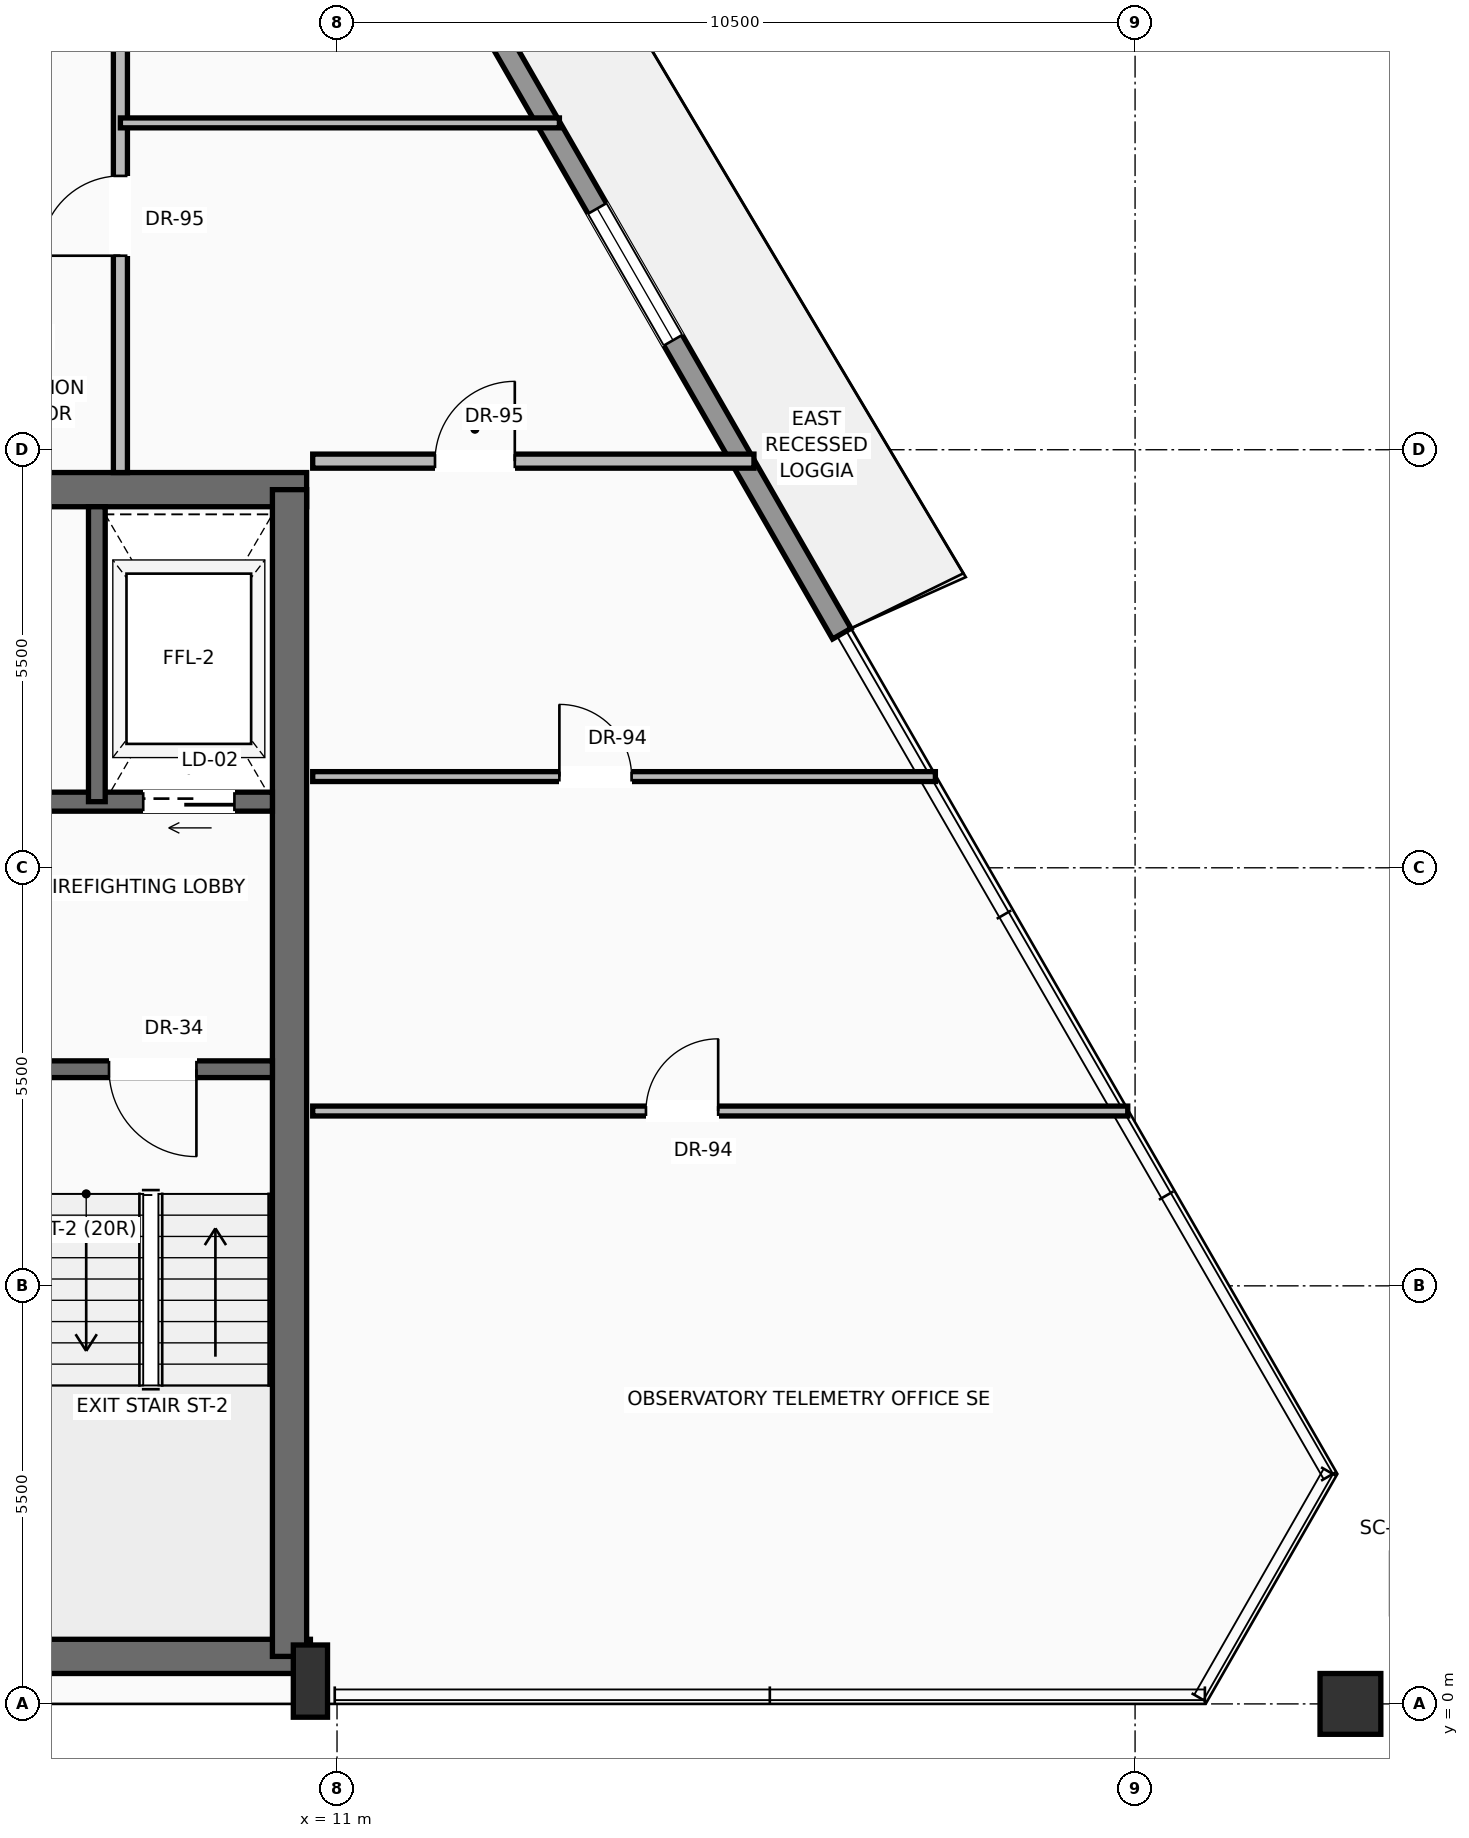
"""IFC4 building model, lengths in metres.
Left out: names, types, materials, properties, quantities, classifications, styles, units other than length and angle.
Written with IfcOpenShell. Run it as: python <this file> out.ifc"""

import sys

from ifc_helpers import new_model, si_unit, direction, frame, frame_2d, origin, origin_2d, place, context, subcontext, project, spatial, rectangle, hollow_rectangle, extrude, source, transform, mapped, element, fill, save


model = new_model("IFC4")
c1 = context("Model", 3, precision=1e-05, world=origin(), true_north=direction((0.0, 1.0)))
c2 = subcontext(c1, "Body", "Model", "MODEL_VIEW")
j1 = project(units=[si_unit("LENGTHUNIT", "METRE"), si_unit("PLANEANGLEUNIT", "RADIAN")], contexts=[c1])
p1 = place(None, origin())
s1 = spatial("IfcSite", under=j1, at=p1, CompositionType="ELEMENT")
p2 = place(p1, origin())
s2 = spatial("IfcBuilding", under=s1, at=p2, CompositionType="ELEMENT")
p3 = place(p2, frame((0.0, 0.0, 297.15)))
s3 = spatial("IfcBuildingStorey", under=s2, at=p3, CompositionType="ELEMENT", Elevation=297.15)
p4 = place(p3, frame((-10.65, 0.625, 0.0), z_axis=(0.0, 0.0, 1.0), x_axis=(1.0, 0.0, 0.0)))
e1 = element("IfcWall", 1, at=p4, inside=s3, PredefinedType="SHEAR", context=c2, shape_type="SweptSolid", body=[
    extrude(rectangle(XDim=21.3, YDim=0.45, at=frame_2d((10.65, 0.0))), origin(), (0.0, 0.0, 1.0), 3.24),
])
p5 = place(p3, frame((-10.6, 15.975, 0.0), z_axis=(0.0, 0.0, 1.0), x_axis=(1.0, 0.0, 0.0)))
e2 = element("IfcWall", 2, at=p5, inside=s3, PredefinedType="SHEAR", context=c2, shape_type="SweptSolid", body=[
    extrude(rectangle(XDim=21.2, YDim=0.45, at=frame_2d((10.6, 0.0))), origin(), (0.0, 0.0, 1.0), 3.24),
])
p6 = place(p5, frame((3.17, 0.0, 0.0)))
e3 = element("IfcOpeningElement", 3, at=p6, cuts=e2, PredefinedType="OPENING", context=c2, shape_type="SweptSolid", body=[
    extrude(rectangle(XDim=1.3, YDim=2.3, at=frame_2d((0.65, 1.15))), frame((0.0, 0.235, 0.0), z_axis=(0.0, -1.0, 0.0), x_axis=(1.0, 0.0, 0.0)), (0.0, 0.0, 1.0), 0.47),
])
p7 = place(p5, frame((9.6, 0.0, 0.0)))
e4 = element("IfcOpeningElement", 4, at=p7, cuts=e2, PredefinedType="OPENING", context=c2, shape_type="SweptSolid", body=[
    extrude(rectangle(XDim=2.0, YDim=2.4, at=frame_2d((1.0, 1.2))), frame((0.0, 0.235, 0.0), z_axis=(0.0, -1.0, 0.0), x_axis=(1.0, 0.0, 0.0)), (0.0, 0.0, 1.0), 0.47),
])
p8 = place(p3, frame((10.375, 0.625, 0.0), z_axis=(0.0, 0.0, 1.0), x_axis=(0.0, 1.0, 0.0)))
e5 = element("IfcWall", 5, at=p8, inside=s3, PredefinedType="SHEAR", context=c2, shape_type="SweptSolid", body=[
    extrude(rectangle(XDim=15.35, YDim=0.45, at=frame_2d((7.675, 0.0))), origin(), (0.0, 0.0, 1.0), 3.24),
])
m1 = source(origin(), c2, "Body", "SweptSolid", [
    extrude(rectangle(XDim=0.45, YDim=0.95, at=origin_2d()), origin(), (0.0, 0.0, 1.0), 3.45),
])
p9 = place(p3, frame((10.65, 0.3, 0.0), z_axis=(0.0, 0.0, 1.0), x_axis=(1.0, 0.0, 0.0)))
e6 = element("IfcColumn", 6, at=p9, inside=s3, PredefinedType="PILASTER", context=c2, shape_type="MappedRepresentation", body=[
    mapped(m1, transform((0.0, 0.0, 0.0), scale=1.0)),
])
m2 = source(origin(), c2, "Body", "SweptSolid", [
    extrude(hollow_rectangle(XDim=0.8, YDim=0.8, WallThickness=0.04, at=origin_2d()), origin(), (0.0, 0.0, 1.0), 3.441),
])
p10 = place(p3, frame((24.333, 0.0, 0.004), z_axis=(-0.004965886556, 0.0, 0.999987669909), x_axis=(0.0, -1.0, 0.0)))
e7 = element("IfcColumn", 7, at=p10, inside=s3, PredefinedType="COLUMN", context=c2, shape_type="MappedRepresentation", body=[
    mapped(m2, transform((0.0, 0.0, 0.0), scale=1.0)),
])
m3 = source(origin(), c2, "Body", "SweptSolid", [
    extrude(hollow_rectangle(XDim=0.8, YDim=0.8, WallThickness=0.04, at=origin_2d()), origin(), (0.0, 0.0, 1.0), 3.442),
])
p11 = place(p3, frame((25.274, 1.585, 0.004), z_axis=(-0.014256272431, -0.015178319902, 0.999783165142), x_axis=(0.728899576498, -0.684620630262, 0.0)))
e8 = element("IfcColumn", 8, at=p11, inside=s3, PredefinedType="COLUMN", context=c2, shape_type="MappedRepresentation", body=[
    mapped(m3, transform((0.0, 0.0, 0.0), scale=1.0)),
])
p12 = place(p3, frame((7.586, 31.561, 0.0), z_axis=(0.0, 0.0, 1.0), x_axis=(0.498604857305, -0.866829392829, 0.0)))
e9 = element("IfcWall", 9, at=p12, inside=s3, PredefinedType="SOLIDWALL", context=c2, shape_type="SweptSolid", body=[
    extrude(rectangle(XDim=20.167, YDim=0.28, at=frame_2d((10.083, 0.0))), origin(), (0.0, 0.0, 1.0), 2.82),
])
p13 = place(p12, frame((4.84, 0.0, 0.0)))
e10 = element("IfcOpeningElement", 10, at=p13, cuts=e9, PredefinedType="OPENING", context=c2, shape_type="SweptSolid", body=[
    extrude(rectangle(XDim=1.6, YDim=2.35, at=frame_2d((0.8, 1.175))), frame((0.0, 0.15, 0.0), z_axis=(0.0, -1.0, 0.0), x_axis=(1.0, 0.0, 0.0)), (0.0, 0.0, 1.0), 0.3),
])
p14 = place(p12, frame((13.714, 0.0, 0.9)))
e11 = element("IfcOpeningElement", 11, at=p14, cuts=e9, PredefinedType="OPENING", context=c2, shape_type="SweptSolid", body=[
    extrude(rectangle(XDim=2.0, YDim=1.75, at=frame_2d((1.0, 0.875))), frame((0.0, 0.15, 0.0), z_axis=(0.0, -1.0, 0.0), x_axis=(1.0, 0.0, 0.0)), (0.0, 0.0, 1.0), 0.3),
])
p15 = place(p3, frame((10.15, 8.35, 0.0), z_axis=(0.0, 0.0, 1.0), x_axis=(-1.0, 0.0, 0.0)))
e12 = element("IfcWall", 12, at=p15, inside=s3, PredefinedType="SOLIDWALL", context=c2, shape_type="SweptSolid", body=[
    extrude(rectangle(XDim=4.65, YDim=0.22, at=frame_2d((2.325, 0.0))), origin(), (0.0, 0.0, 1.0), 3.24),
])
p16 = place(p15, frame((1.0, 0.0, 0.0)))
e13 = element("IfcOpeningElement", 13, at=p16, cuts=e12, PredefinedType="OPENING", context=c2, shape_type="SweptSolid", body=[
    extrude(rectangle(XDim=1.15, YDim=2.2, at=frame_2d((0.575, 1.1))), frame((0.0, 0.12, 0.0), z_axis=(0.0, -1.0, 0.0), x_axis=(1.0, 0.0, 0.0)), (0.0, 0.0, 1.0), 0.24),
])
p17 = place(p3, frame((10.15, 11.87, 0.0), z_axis=(0.0, 0.0, 1.0), x_axis=(-1.0, 0.0, 0.0)))
e14 = element("IfcWall", 14, at=p17, inside=s3, PredefinedType="SOLIDWALL", context=c2, shape_type="SweptSolid", body=[
    extrude(rectangle(XDim=4.65, YDim=0.25, at=frame_2d((2.325, 0.0))), origin(), (0.0, 0.0, 1.0), 3.24),
])
p18 = place(p17, frame((0.5, 0.0, 0.0)))
e15 = element("IfcOpeningElement", 15, at=p18, cuts=e14, PredefinedType="OPENING", context=c2, shape_type="SweptSolid", body=[
    extrude(rectangle(XDim=1.2, YDim=2.25, at=frame_2d((0.6, 1.125))), frame((0.0, 0.135, 0.0), z_axis=(0.0, -1.0, 0.0), x_axis=(1.0, 0.0, 0.0)), (0.0, 0.0, 1.0), 0.27),
])
p19 = place(p3, frame((7.84, 11.87, 0.0), z_axis=(0.0, 0.0, 1.0), x_axis=(0.0, 1.0, 0.0)))
e16 = element("IfcWall", 16, at=p19, inside=s3, PredefinedType="SOLIDWALL", context=c2, shape_type="SweptSolid", body=[
    extrude(rectangle(XDim=3.88, YDim=0.22, at=frame_2d((1.94, 0.0))), origin(), (0.0, 0.0, 1.0), 3.24),
])
p20 = place(p3, frame((8.15, 16.2, 0.0), z_axis=(0.0, 0.0, 1.0), x_axis=(0.0, 1.0, 0.0)))
e17 = element("IfcWall", 17, at=p20, inside=s3, PredefinedType="PARTITIONING", context=c2, shape_type="SweptSolid", body=[
    extrude(rectangle(XDim=13.6, YDim=0.185, at=frame_2d((6.8, 0.0))), origin(), (0.0, 0.0, 1.0), 3.232),
])
p21 = place(p20, frame((2.853, 0.0, 0.0)))
e18 = element("IfcOpeningElement", 18, at=p21, cuts=e17, PredefinedType="OPENING", context=c2, shape_type="SweptSolid", body=[
    extrude(rectangle(XDim=1.05, YDim=2.25, at=frame_2d((0.525, 1.125))), frame((0.0, 0.103, 0.0), z_axis=(0.0, -1.0, 0.0), x_axis=(1.0, 0.0, 0.0)), (0.0, 0.0, 1.0), 0.205),
])
p22 = place(p20, frame((6.853, 0.0, 0.0)))
e19 = element("IfcOpeningElement", 19, at=p22, cuts=e17, PredefinedType="OPENING", context=c2, shape_type="SweptSolid", body=[
    extrude(rectangle(XDim=1.05, YDim=2.25, at=frame_2d((0.525, 1.125))), frame((0.0, 0.103, 0.0), z_axis=(0.0, -1.0, 0.0), x_axis=(1.0, 0.0, 0.0)), (0.0, 0.0, 1.0), 0.205),
])
p23 = place(p20, frame((11.185, 0.0, 0.0)))
e20 = element("IfcOpeningElement", 20, at=p23, cuts=e17, PredefinedType="OPENING", context=c2, shape_type="SweptSolid", body=[
    extrude(rectangle(XDim=1.05, YDim=2.25, at=frame_2d((0.525, 1.125))), frame((0.0, 0.103, 0.0), z_axis=(0.0, -1.0, 0.0), x_axis=(1.0, 0.0, 0.0)), (0.0, 0.0, 1.0), 0.205),
])
p24 = place(p3, frame((10.68, 16.35, 0.0), z_axis=(0.0, 0.0, 1.0), x_axis=(1.0, 0.0, 0.0)))
e21 = element("IfcWall", 21, at=p24, inside=s3, PredefinedType="PARTITIONING", context=c2, shape_type="SweptSolid", body=[
    extrude(rectangle(XDim=5.806, YDim=0.185, at=frame_2d((2.903, 0.0))), origin(), (0.0, 0.0, 1.0), 3.232),
])
p25 = place(p24, frame((1.609, 0.0, 0.0)))
e22 = element("IfcOpeningElement", 22, at=p25, cuts=e21, PredefinedType="OPENING", context=c2, shape_type="SweptSolid", body=[
    extrude(rectangle(XDim=1.05, YDim=2.25, at=frame_2d((0.525, 1.125))), frame((0.0, 0.103, 0.0), z_axis=(0.0, -1.0, 0.0), x_axis=(1.0, 0.0, 0.0)), (0.0, 0.0, 1.0), 0.205),
])
p26 = place(p3, frame((10.68, 7.8, 0.0), z_axis=(0.0, 0.0, 1.0), x_axis=(1.0, 0.0, 0.0)))
e23 = element("IfcWall", 23, at=p26, inside=s3, PredefinedType="PARTITIONING", context=c2, shape_type="SweptSolid", body=[
    extrude(rectangle(XDim=10.724, YDim=0.13, at=frame_2d((5.362, 0.0))), origin(), (0.0, 0.0, 1.0), 3.232),
])
p27 = place(p26, frame((4.385, 0.0, 0.0)))
e24 = element("IfcOpeningElement", 24, at=p27, cuts=e23, PredefinedType="OPENING", context=c2, shape_type="SweptSolid", body=[
    extrude(rectangle(XDim=0.95, YDim=2.2, at=frame_2d((0.475, 1.1))), frame((0.0, 0.075, 0.0), z_axis=(0.0, -1.0, 0.0), x_axis=(1.0, 0.0, 0.0)), (0.0, 0.0, 1.0), 0.15),
])
p28 = place(p3, frame((10.68, 12.2, 0.0), z_axis=(0.0, 0.0, 1.0), x_axis=(1.0, 0.0, 0.0)))
e25 = element("IfcWall", 25, at=p28, inside=s3, PredefinedType="PARTITIONING", context=c2, shape_type="SweptSolid", body=[
    extrude(rectangle(XDim=8.193, YDim=0.13, at=frame_2d((4.096, 0.0))), origin(), (0.0, 0.0, 1.0), 3.232),
])
p29 = place(p28, frame((3.246, 0.0, 0.0)))
e26 = element("IfcOpeningElement", 26, at=p29, cuts=e25, PredefinedType="OPENING", context=c2, shape_type="SweptSolid", body=[
    extrude(rectangle(XDim=0.95, YDim=2.2, at=frame_2d((0.475, 1.1))), frame((0.0, 0.075, 0.0), z_axis=(0.0, -1.0, 0.0), x_axis=(1.0, 0.0, 0.0)), (0.0, 0.0, 1.0), 0.15),
])
p30 = place(p3, frame((8.15, 20.8, 0.0), z_axis=(0.0, 0.0, 1.0), x_axis=(1.0, 0.0, 0.0)))
e27 = element("IfcWall", 27, at=p30, inside=s3, PredefinedType="PARTITIONING", context=c2, shape_type="SweptSolid", body=[
    extrude(rectangle(XDim=5.776, YDim=0.13, at=frame_2d((2.888, 0.0))), origin(), (0.0, 0.0, 1.0), 3.232),
])
m4 = source(origin(), c2, "Body", "SweptSolid", [
    extrude(rectangle(XDim=2.0, YDim=1.75, at=frame_2d((1.0, 0.875))), frame((0.0, 0.03, 0.0), z_axis=(0.0, -1.0, 0.0), x_axis=(1.0, 0.0, 0.0)), (0.0, 0.0, 1.0), 0.06),
])
p31 = place(p14, origin())
e28 = element("IfcWindow", 28, at=p31, inside=s3, PartitioningType="SINGLE_PANEL", PredefinedType="WINDOW", context=c2, shape_type="MappedRepresentation", body=[
    mapped(m4, transform((0.0, 0.0, 0.0), scale=1.0)),
])
fill(e11, e28)
m5 = source(origin(), c2, "Body", "SweptSolid", [
    extrude(rectangle(XDim=1.15, YDim=2.2, at=frame_2d((0.575, 1.1))), frame((0.0, 0.025, 0.0), z_axis=(0.0, -1.0, 0.0), x_axis=(1.0, 0.0, 0.0)), (0.0, 0.0, 1.0), 0.05),
])
p32 = place(p16, origin())
e29 = element("IfcDoor", 29, at=p32, inside=s3, OperationType="SINGLE_SWING_LEFT", PredefinedType="DOOR", context=c2, shape_type="MappedRepresentation", body=[
    mapped(m5, transform((0.0, 0.0, 0.0), scale=1.0)),
])
fill(e13, e29)
m6 = source(origin(), c2, "Body", "SweptSolid", [
    extrude(rectangle(XDim=1.2, YDim=2.25, at=frame_2d((0.6, 1.125))), frame((0.0, 0.025, 0.0), z_axis=(0.0, -1.0, 0.0), x_axis=(1.0, 0.0, 0.0)), (0.0, 0.0, 1.0), 0.05),
])
p33 = place(p18, origin())
e30 = element("IfcDoor", 30, at=p33, inside=s3, OperationType="SLIDING_TO_RIGHT", PredefinedType="DOOR", context=c2, shape_type="MappedRepresentation", body=[
    mapped(m6, transform((0.0, 0.0, 0.0), scale=1.0)),
])
fill(e15, e30)
m7 = source(origin(), c2, "Body", "SweptSolid", [
    extrude(rectangle(XDim=1.05, YDim=2.25, at=frame_2d((0.525, 1.125))), frame((0.0, 0.025, 0.0), z_axis=(0.0, -1.0, 0.0), x_axis=(1.0, 0.0, 0.0)), (0.0, 0.0, 1.0), 0.05),
])
p34 = place(p25, origin())
e31 = element("IfcDoor", 31, at=p34, inside=s3, OperationType="SINGLE_SWING_RIGHT", PredefinedType="DOOR", context=c2, shape_type="MappedRepresentation", body=[
    mapped(m7, transform((0.0, 0.0, 0.0), scale=1.0)),
])
fill(e22, e31)
m8 = source(origin(), c2, "Body", "SweptSolid", [
    extrude(rectangle(XDim=0.95, YDim=2.2, at=frame_2d((0.475, 1.1))), frame((0.0, 0.025, 0.0), z_axis=(0.0, -1.0, 0.0), x_axis=(1.0, 0.0, 0.0)), (0.0, 0.0, 1.0), 0.05),
])
p35 = place(p27, origin())
e32 = element("IfcDoor", 32, at=p35, inside=s3, OperationType="SINGLE_SWING_RIGHT", PredefinedType="DOOR", context=c2, shape_type="MappedRepresentation", body=[
    mapped(m8, transform((0.0, 0.0, 0.0), scale=1.0)),
])
fill(e24, e32)
p36 = place(p29, origin())
e33 = element("IfcDoor", 33, at=p36, inside=s3, OperationType="SINGLE_SWING_LEFT", PredefinedType="DOOR", context=c2, shape_type="MappedRepresentation", body=[
    mapped(m8, transform((0.0, 0.0, 0.0), scale=1.0)),
])
fill(e26, e33)
p37 = place(p21, origin())
e34 = element("IfcDoor", 34, at=p37, inside=s3, OperationType="SINGLE_SWING_LEFT", PredefinedType="DOOR", context=c2, shape_type="MappedRepresentation", body=[
    mapped(m7, transform((0.0, 0.0, 0.0), scale=1.0)),
])
fill(e18, e34)
save(model, sys.argv[1])
